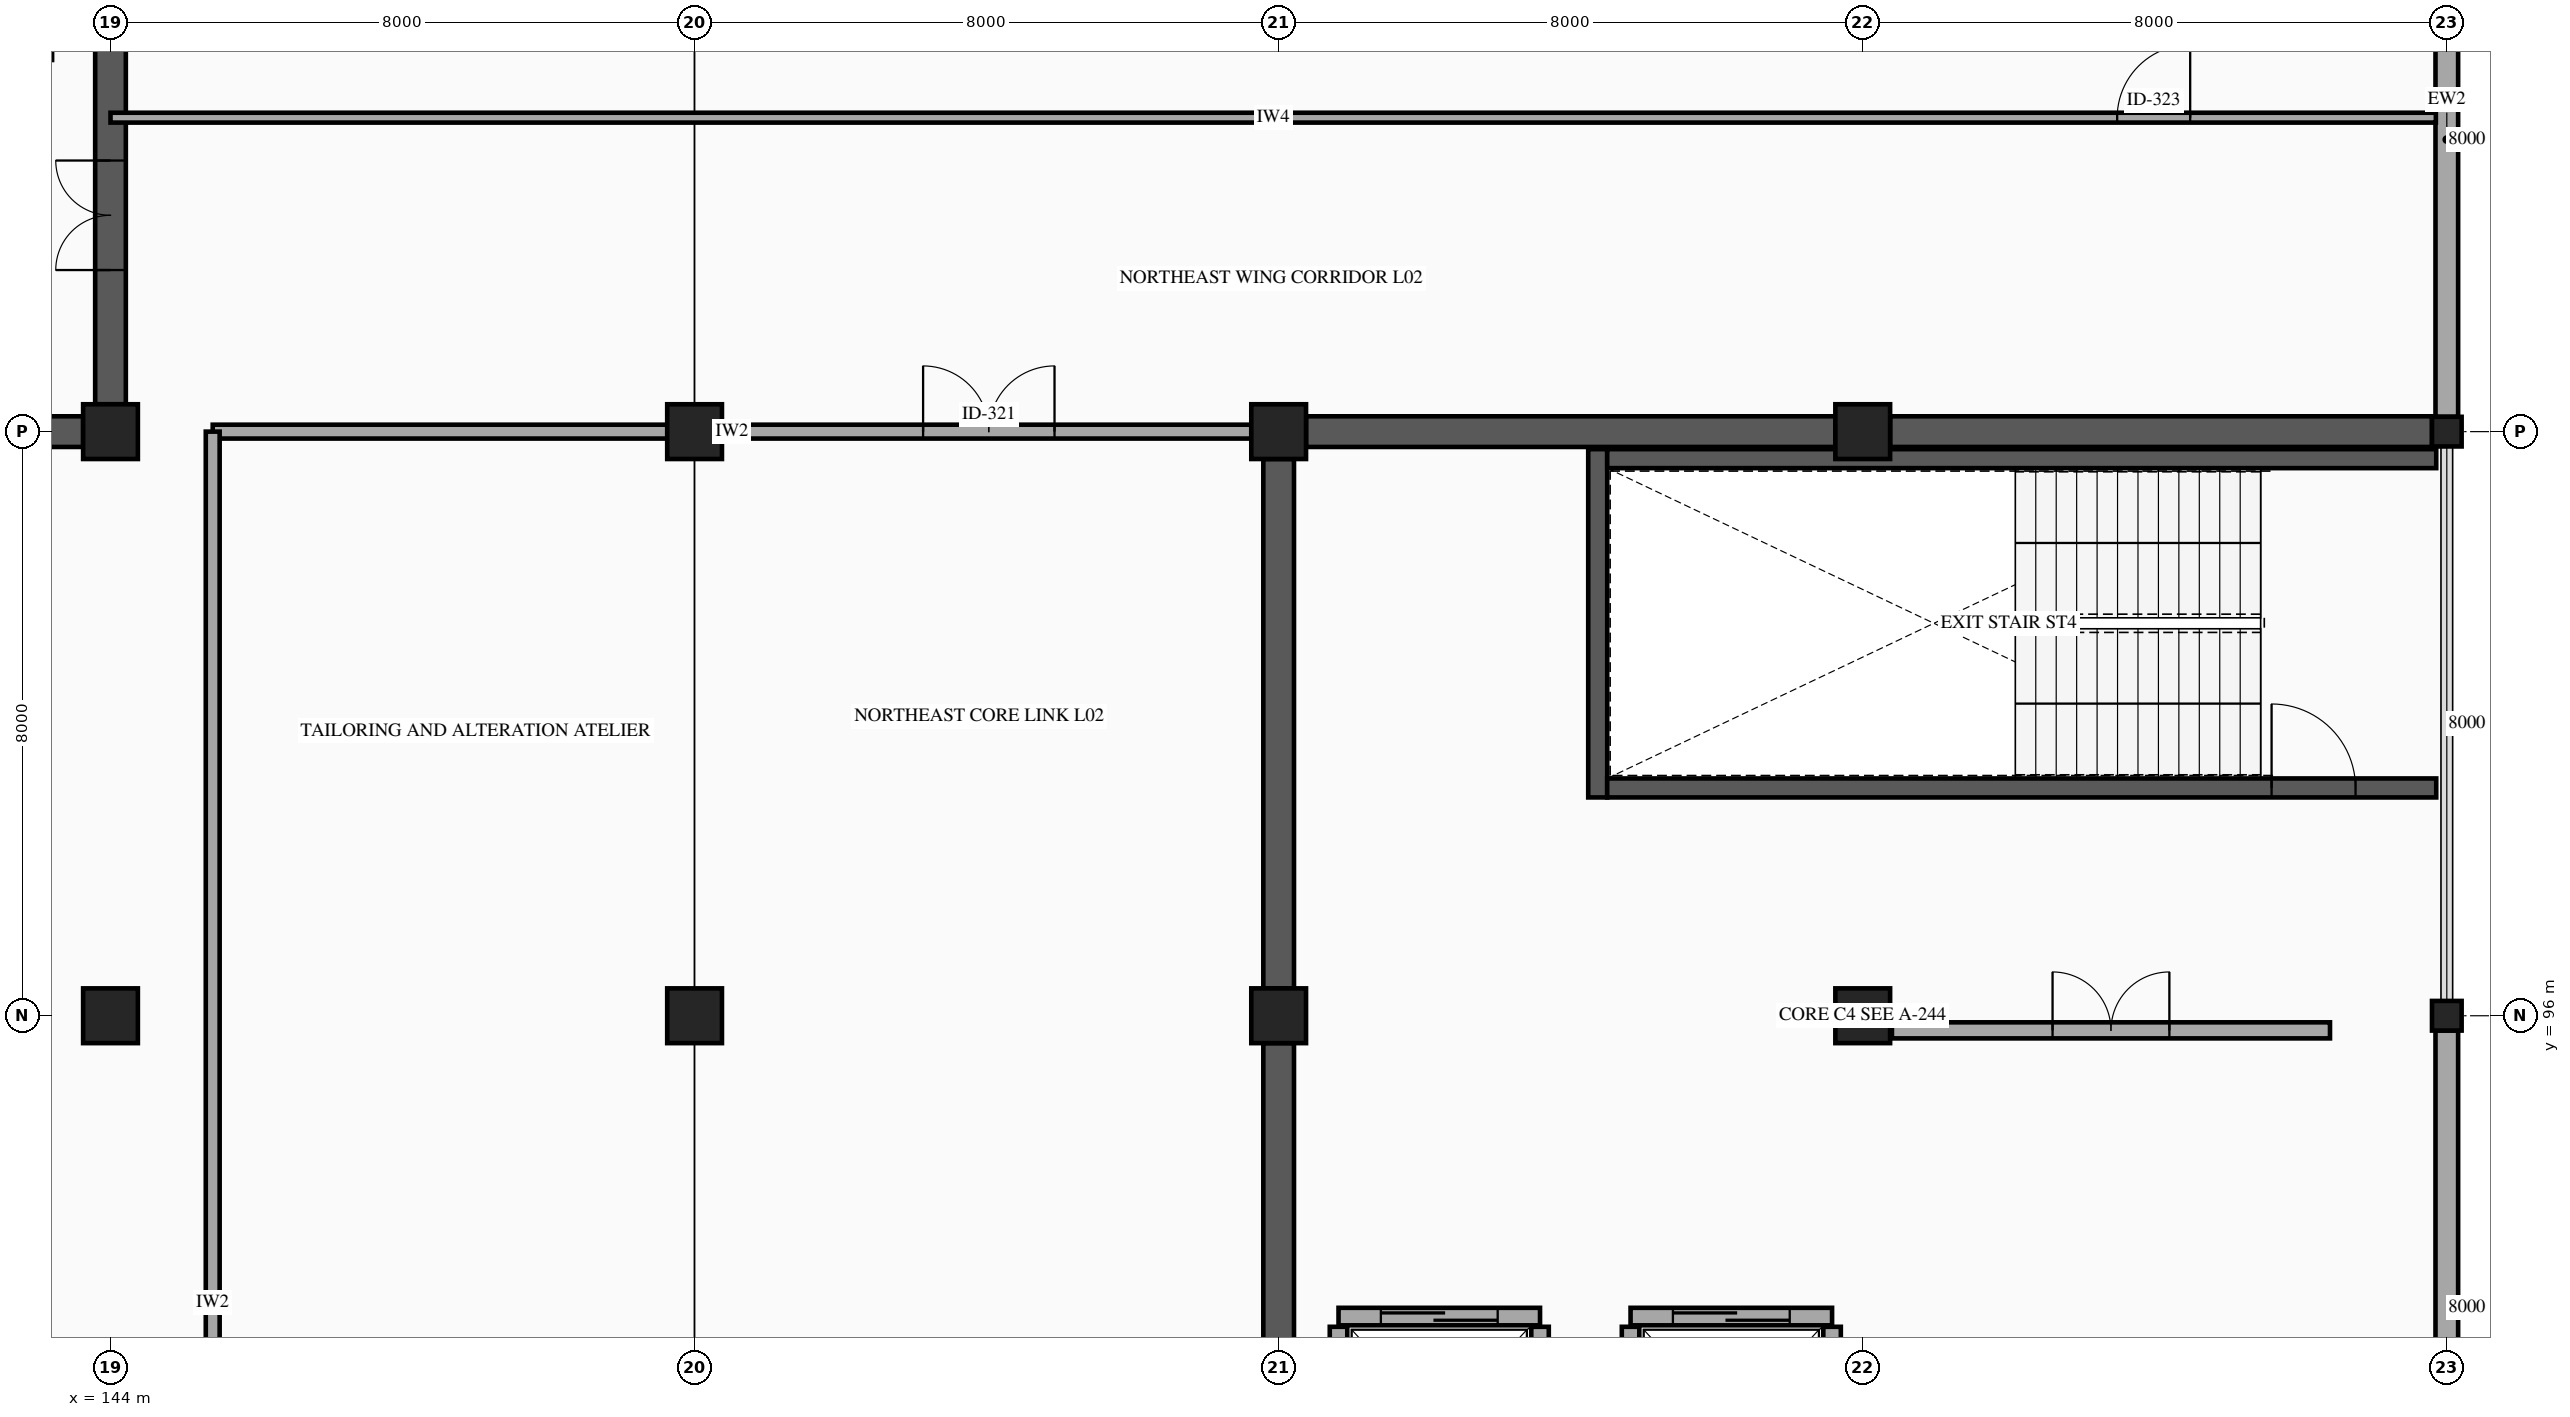
"""IFC4 building model, lengths in metres.
Left out: names, types, materials, properties, quantities, classifications, styles, units other than length and angle.
Written with IfcOpenShell. Run it as: python <this file> out.ifc"""

import sys

from ifc_helpers import new_model, si_unit, direction, frame, frame_2d, origin, origin_2d, place, context, subcontext, project, spatial, rectangle, hollow_rectangle, extrude, element, fill, save


model = new_model("IFC4")
c1 = context("Model", 3, precision=1e-05, world=origin(), true_north=direction((0.0, 1.0)))
c2 = subcontext(c1, "Body", "Model", "MODEL_VIEW")
j1 = project(units=[si_unit("LENGTHUNIT", "METRE"), si_unit("PLANEANGLEUNIT", "RADIAN")], contexts=[c1])
p1 = place(None, origin())
s1 = spatial("IfcSite", under=j1, at=p1, CompositionType="ELEMENT")
p2 = place(p1, origin())
s2 = spatial("IfcBuilding", under=s1, at=p2, CompositionType="ELEMENT")
p3 = place(p2, frame((0.0, 0.0, 10.4)))
s3 = spatial("IfcBuildingStorey", under=s2, at=p3, CompositionType="ELEMENT", Elevation=10.4)
for number, where, z_axis, x_axis in (
    (1, (144.0, 96.0, 0.0), (0.0, 0.0, 1.0), (1.0, 0.0, 0.0)),
    (2, (144.0, 104.0, 0.0), (0.0, 0.0, 1.0), (1.0, 0.0, 0.0)),
    (3, (152.0, 96.0, 0.0), (0.0, 0.0, 1.0), (1.0, 0.0, 0.0)),
    (4, (152.0, 104.0, 0.0), (0.0, 0.0, 1.0), (1.0, 0.0, 0.0)),
    (5, (160.0, 96.0, 0.0), (0.0, 0.0, 1.0), (1.0, 0.0, 0.0)),
    (6, (160.0, 104.0, 0.0), (0.0, 0.0, 1.0), (1.0, 0.0, 0.0)),
    (7, (168.0, 96.0, 0.0), (0.0, 0.0, 1.0), (1.0, 0.0, 0.0)),
    (8, (168.0, 104.0, 0.0), (0.0, 0.0, 1.0), (1.0, 0.0, 0.0)),
):
    element("IfcColumn", number, at=place(p3, frame(where, z_axis=z_axis, x_axis=x_axis)), inside=s3, PredefinedType="COLUMN", context=c2, shape_type="SweptSolid", body=[
        extrude(rectangle(XDim=0.75, YDim=0.75, at=origin_2d()), origin(), (0.0, 0.0, 1.0), 4.5),
    ])
for number, where, z_axis, x_axis in (
    (9, (176.0, 96.0, 0.0), (0.0, 0.0, 1.0), (1.0, 0.0, 0.0)),
    (10, (176.0, 104.0, 0.0), (0.0, 0.0, 1.0), (1.0, 0.0, 0.0)),
):
    element("IfcColumn", number, at=place(p3, frame(where, z_axis=z_axis, x_axis=x_axis)), inside=s3, PredefinedType="COLUMN", context=c2, shape_type="SweptSolid", body=[
        extrude(hollow_rectangle(XDim=0.406, YDim=0.406, WallThickness=0.015, InnerFilletRadius=0.015, OuterFilletRadius=0.029, at=origin_2d()), origin(), (0.0, 0.0, 1.0), 4.5),
    ])
for number, where, z_axis, x_axis in (
    (11, (176.0, 111.797, 0.0), (0.0, 0.0, 1.0), (0.0, -1.0, 0.0)),
    (12, (176.0, 95.797, 0.0), (0.0, 0.0, 1.0), (0.0, -1.0, 0.0)),
):
    element("IfcWall", number, at=place(p3, frame(where, z_axis=z_axis, x_axis=x_axis)), inside=s3, PredefinedType="STANDARD", context=c2, shape_type="SweptSolid", body=[
        extrude(rectangle(XDim=7.594, YDim=0.31, at=frame_2d((3.797, 0.0))), origin(), (0.0, 0.0, 1.0), 3.48),
    ])
p4 = place(p3, frame((136.375, 104.0, 0.0), z_axis=(0.0, 0.0, 1.0), x_axis=(1.0, 0.0, 0.0)))
e13 = element("IfcWall", 13, at=p4, inside=s3, PredefinedType="SHEAR", context=c2, shape_type="SweptSolid", body=[
    extrude(rectangle(XDim=7.25, YDim=0.42, at=frame_2d((3.625, 0.0))), origin(), (0.0, 0.0, 1.0), 4.28),
])
p5 = place(p4, frame((2.875, 0.0, 0.0)))
e14 = element("IfcOpeningElement", 14, at=p5, cuts=e13, PredefinedType="OPENING", context=c2, shape_type="SweptSolid", body=[
    extrude(rectangle(XDim=1.5, YDim=2.15, at=frame_2d((0.75, 1.075))), frame((0.0, 0.22, 0.0), z_axis=(0.0, -1.0, 0.0), x_axis=(1.0, 0.0, 0.0)), (0.0, 0.0, 1.0), 0.44),
])
p6 = place(p3, frame((144.0, 104.375, 0.0), z_axis=(0.0, 0.0, 1.0), x_axis=(0.0, 1.0, 0.0)))
e15 = element("IfcWall", 15, at=p6, inside=s3, PredefinedType="SHEAR", context=c2, shape_type="SweptSolid", body=[
    extrude(rectangle(XDim=7.25, YDim=0.42, at=frame_2d((3.625, 0.0))), origin(), (0.0, 0.0, 1.0), 4.28),
])
p7 = place(p6, frame((1.838, 0.0, 0.0)))
e16 = element("IfcOpeningElement", 16, at=p7, cuts=e15, PredefinedType="OPENING", context=c2, shape_type="SweptSolid", body=[
    extrude(rectangle(XDim=1.5, YDim=2.15, at=frame_2d((0.75, 1.075))), frame((0.0, 0.22, 0.0), z_axis=(0.0, -1.0, 0.0), x_axis=(1.0, 0.0, 0.0)), (0.0, 0.0, 1.0), 0.44),
])
p8 = place(p3, frame((164.37, 98.99, 0.0), z_axis=(0.0, 0.0, 1.0), x_axis=(0.0, 1.0, 0.0)))
e17 = element("IfcWall", 17, at=p8, inside=s3, PredefinedType="SHEAR", context=c2, shape_type="SweptSolid", body=[
    extrude(rectangle(XDim=4.77, YDim=0.26, at=frame_2d((2.385, 0.0))), origin(), (0.0, 0.0, 1.0), 4.28),
])
p9 = place(p3, frame((164.5, 99.12, 0.0), z_axis=(0.0, 0.0, 1.0), x_axis=(1.0, 0.0, 0.0)))
e18 = element("IfcWall", 18, at=p9, inside=s3, PredefinedType="SHEAR", context=c2, shape_type="SweptSolid", body=[
    extrude(rectangle(XDim=11.355, YDim=0.26, at=frame_2d((5.677, 0.0))), origin(), (0.0, 0.0, 1.0), 4.28),
])
p10 = place(p9, frame((9.1, 0.0, 0.0)))
e19 = element("IfcOpeningElement", 19, at=p10, cuts=e18, PredefinedType="OPENING", context=c2, shape_type="SweptSolid", body=[
    extrude(rectangle(XDim=1.15, YDim=2.15, at=frame_2d((0.575, 1.075))), frame((0.0, 0.14, 0.0), z_axis=(0.0, -1.0, 0.0), x_axis=(1.0, 0.0, 0.0)), (0.0, 0.0, 1.0), 0.28),
])
p11 = place(p3, frame((164.5, 103.63, 0.0), z_axis=(0.0, 0.0, 1.0), x_axis=(1.0, 0.0, 0.0)))
e20 = element("IfcWall", 20, at=p11, inside=s3, PredefinedType="SHEAR", context=c2, shape_type="SweptSolid", body=[
    extrude(rectangle(XDim=11.355, YDim=0.26, at=frame_2d((5.677, 0.0))), origin(), (0.0, 0.0, 1.0), 4.28),
])
p12 = place(p3, frame((160.375, 104.0, 0.0), z_axis=(0.0, 0.0, 1.0), x_axis=(1.0, 0.0, 0.0)))
e21 = element("IfcWall", 21, at=p12, inside=s3, PredefinedType="SHEAR", context=c2, shape_type="SweptSolid", body=[
    extrude(rectangle(XDim=7.25, YDim=0.42, at=frame_2d((3.625, 0.0))), origin(), (0.0, 0.0, 1.0), 4.28),
])
p13 = place(p3, frame((168.375, 104.0, 0.0), z_axis=(0.0, 0.0, 1.0), x_axis=(1.0, 0.0, 0.0)))
e22 = element("IfcWall", 22, at=p13, inside=s3, PredefinedType="SHEAR", context=c2, shape_type="SweptSolid", body=[
    extrude(rectangle(XDim=7.422, YDim=0.42, at=frame_2d((3.711, 0.0))), origin(), (0.0, 0.0, 1.0), 4.28),
])
for number, where, z_axis, x_axis in (
    (23, (160.0, 88.375, 0.0), (0.0, 0.0, 1.0), (0.0, 1.0, 0.0)),
    (24, (160.0, 96.375, 0.0), (0.0, 0.0, 1.0), (0.0, 1.0, 0.0)),
):
    element("IfcWall", number, at=place(p3, frame(where, z_axis=z_axis, x_axis=x_axis)), inside=s3, PredefinedType="SHEAR", context=c2, shape_type="SweptSolid", body=[
        extrude(rectangle(XDim=7.25, YDim=0.42, at=frame_2d((3.625, 0.0))), origin(), (0.0, 0.0, 1.0), 4.28),
    ])
p14 = place(p3, frame((164.82, 91.88, 0.0), z_axis=(0.0, 0.0, 1.0), x_axis=(1.0, 0.0, 0.0)))
e25 = element("IfcWall", 25, at=p14, inside=s3, PredefinedType="PARTITIONING", context=c2, shape_type="SweptSolid", body=[
    extrude(rectangle(XDim=2.76, YDim=0.24, at=frame_2d((1.38, 0.0))), origin(), (0.0, 0.0, 1.0), 4.28),
])
p15 = place(p14, frame((0.58, 0.0, 0.0)))
e26 = element("IfcOpeningElement", 26, at=p15, cuts=e25, PredefinedType="OPENING", context=c2, shape_type="SweptSolid", body=[
    extrude(rectangle(XDim=1.6, YDim=2.3, at=frame_2d((0.8, 1.15))), frame((0.0, 0.13, 0.0), z_axis=(0.0, -1.0, 0.0), x_axis=(1.0, 0.0, 0.0)), (0.0, 0.0, 1.0), 0.26),
])
for number, where, z_axis, x_axis in (
    (27, (164.82, 89.06, 0.0), (0.0, 0.0, 1.0), (0.0, 1.0, 0.0)),
    (28, (167.58, 89.06, 0.0), (0.0, 0.0, 1.0), (0.0, 1.0, 0.0)),
):
    element("IfcWall", number, at=place(p3, frame(where, z_axis=z_axis, x_axis=x_axis)), inside=s3, PredefinedType="PARTITIONING", context=c2, shape_type="SweptSolid", body=[
        extrude(rectangle(XDim=2.68, YDim=0.24, at=frame_2d((1.34, 0.0))), origin(), (0.0, 0.0, 1.0), 4.28),
    ])
p16 = place(p3, frame((160.82, 91.88, 0.0), z_axis=(0.0, 0.0, 1.0), x_axis=(1.0, 0.0, 0.0)))
e29 = element("IfcWall", 29, at=p16, inside=s3, PredefinedType="PARTITIONING", context=c2, shape_type="SweptSolid", body=[
    extrude(rectangle(XDim=2.76, YDim=0.24, at=frame_2d((1.38, 0.0))), origin(), (0.0, 0.0, 1.0), 4.28),
])
p17 = place(p16, frame((0.58, 0.0, 0.0)))
e30 = element("IfcOpeningElement", 30, at=p17, cuts=e29, PredefinedType="OPENING", context=c2, shape_type="SweptSolid", body=[
    extrude(rectangle(XDim=1.6, YDim=2.3, at=frame_2d((0.8, 1.15))), frame((0.0, 0.13, 0.0), z_axis=(0.0, -1.0, 0.0), x_axis=(1.0, 0.0, 0.0)), (0.0, 0.0, 1.0), 0.26),
])
for number, where, z_axis, x_axis in (
    (31, (160.82, 89.06, 0.0), (0.0, 0.0, 1.0), (0.0, 1.0, 0.0)),
    (32, (163.58, 89.06, 0.0), (0.0, 0.0, 1.0), (0.0, 1.0, 0.0)),
):
    element("IfcWall", number, at=place(p3, frame(where, z_axis=z_axis, x_axis=x_axis)), inside=s3, PredefinedType="PARTITIONING", context=c2, shape_type="SweptSolid", body=[
        extrude(rectangle(XDim=2.68, YDim=0.24, at=frame_2d((1.34, 0.0))), origin(), (0.0, 0.0, 1.0), 4.28),
    ])
p18 = place(p3, frame((168.4, 95.8, 0.0), z_axis=(0.0, 0.0, 1.0), x_axis=(1.0, 0.0, 0.0)))
e33 = element("IfcWall", 33, at=p18, inside=s3, PredefinedType="PARTITIONING", context=c2, shape_type="SweptSolid", body=[
    extrude(rectangle(XDim=6.0, YDim=0.22, at=frame_2d((3.0, 0.0))), origin(), (0.0, 0.0, 1.0), 3.48),
])
p19 = place(p18, frame((2.2, 0.0, 0.0)))
e34 = element("IfcOpeningElement", 34, at=p19, cuts=e33, PredefinedType="OPENING", context=c2, shape_type="SweptSolid", body=[
    extrude(rectangle(XDim=1.6, YDim=2.15, at=frame_2d((0.8, 1.075))), frame((0.0, 0.12, 0.0), z_axis=(0.0, -1.0, 0.0), x_axis=(1.0, 0.0, 0.0)), (0.0, 0.0, 1.0), 0.24),
])
p20 = place(p3, frame((145.4, 104.0, 0.0), z_axis=(0.0, 0.0, 1.0), x_axis=(1.0, 0.0, 0.0)))
e35 = element("IfcWall", 35, at=p20, inside=s3, PredefinedType="PARTITIONING", context=c2, shape_type="SweptSolid", body=[
    extrude(rectangle(XDim=14.225, YDim=0.19, at=frame_2d((7.113, 0.0))), origin(), (0.0, 0.0, 1.0), 3.48),
])
p21 = place(p20, frame((9.73, 0.0, 0.0)))
e36 = element("IfcOpeningElement", 36, at=p21, cuts=e35, PredefinedType="OPENING", context=c2, shape_type="SweptSolid", body=[
    extrude(rectangle(XDim=1.8, YDim=2.25, at=frame_2d((0.9, 1.125))), frame((0.0, 0.105, 0.0), z_axis=(0.0, -1.0, 0.0), x_axis=(1.0, 0.0, 0.0)), (0.0, 0.0, 1.0), 0.21),
])
p22 = place(p3, frame((145.4, 80.15, 0.0), z_axis=(0.0, 0.0, 1.0), x_axis=(0.0, 1.0, 0.0)))
e37 = element("IfcWall", 37, at=p22, inside=s3, PredefinedType="PARTITIONING", context=c2, shape_type="SweptSolid", body=[
    extrude(rectangle(XDim=23.85, YDim=0.19, at=frame_2d((11.925, 0.0))), origin(), (0.0, 0.0, 1.0), 3.48),
])
p23 = place(p22, frame((2.862, 0.0, 0.0)))
e38 = element("IfcOpeningElement", 38, at=p23, cuts=e37, PredefinedType="OPENING", context=c2, shape_type="SweptSolid", body=[
    extrude(rectangle(XDim=1.8, YDim=2.25, at=frame_2d((0.9, 1.125))), frame((0.0, 0.105, 0.0), z_axis=(0.0, -1.0, 0.0), x_axis=(1.0, 0.0, 0.0)), (0.0, 0.0, 1.0), 0.21),
])
p24 = place(p3, frame((144.0, 108.3, 0.0), z_axis=(0.0, 0.0, 1.0), x_axis=(1.0, 0.0, 0.0)))
e39 = element("IfcWall", 39, at=p24, inside=s3, PredefinedType="PARTITIONING", context=c2, shape_type="SweptSolid", body=[
    extrude(rectangle(XDim=31.85, YDim=0.135, at=frame_2d((15.925, 0.0))), origin(), (0.0, 0.0, 1.0), 3.48),
])
p25 = place(p24, frame((27.485, 0.0, 0.0)))
e40 = element("IfcOpeningElement", 40, at=p25, cuts=e39, PredefinedType="OPENING", context=c2, shape_type="SweptSolid", body=[
    extrude(rectangle(XDim=1.0, YDim=2.15, at=frame_2d((0.5, 1.075))), frame((0.0, 0.077, 0.0), z_axis=(0.0, -1.0, 0.0), x_axis=(1.0, 0.0, 0.0)), (0.0, 0.0, 1.0), 0.155),
])
p26 = place(p7, origin())
e41 = element("IfcDoor", 41, at=p26, inside=s3, OperationType="DOUBLE_DOOR_SINGLE_SWING", PredefinedType="DOOR", context=c2, shape_type="SweptSolid", body=[
    extrude(rectangle(XDim=1.5, YDim=2.15, at=frame_2d((0.75, 1.075))), frame((0.0, 0.025, 0.0), z_axis=(0.0, -1.0, 0.0), x_axis=(1.0, 0.0, 0.0)), (0.0, 0.0, 1.0), 0.05),
])
fill(e16, e41)
p27 = place(p10, origin())
e42 = element("IfcDoor", 42, at=p27, inside=s3, OperationType="SINGLE_SWING_LEFT", PredefinedType="DOOR", context=c2, shape_type="SweptSolid", body=[
    extrude(rectangle(XDim=1.15, YDim=2.15, at=frame_2d((0.575, 1.075))), frame((0.0, 0.025, 0.0), z_axis=(0.0, -1.0, 0.0), x_axis=(1.0, 0.0, 0.0)), (0.0, 0.0, 1.0), 0.05),
])
fill(e19, e42)
p28 = place(p15, origin())
e43 = element("IfcDoor", 43, at=p28, inside=s3, OperationType="SLIDING_TO_LEFT", PredefinedType="DOOR", context=c2, shape_type="SweptSolid", body=[
    extrude(rectangle(XDim=1.6, YDim=2.3, at=frame_2d((0.8, 1.15))), frame((0.0, 0.025, 0.0), z_axis=(0.0, -1.0, 0.0), x_axis=(1.0, 0.0, 0.0)), (0.0, 0.0, 1.0), 0.05),
])
fill(e26, e43)
p29 = place(p17, origin())
e44 = element("IfcDoor", 44, at=p29, inside=s3, OperationType="SLIDING_TO_LEFT", PredefinedType="DOOR", context=c2, shape_type="SweptSolid", body=[
    extrude(rectangle(XDim=1.6, YDim=2.3, at=frame_2d((0.8, 1.15))), frame((0.0, 0.025, 0.0), z_axis=(0.0, -1.0, 0.0), x_axis=(1.0, 0.0, 0.0)), (0.0, 0.0, 1.0), 0.05),
])
fill(e30, e44)
p30 = place(p19, origin())
e45 = element("IfcDoor", 45, at=p30, inside=s3, OperationType="DOUBLE_DOOR_SINGLE_SWING", PredefinedType="DOOR", context=c2, shape_type="SweptSolid", body=[
    extrude(rectangle(XDim=1.6, YDim=2.15, at=frame_2d((0.8, 1.075))), frame((0.0, 0.025, 0.0), z_axis=(0.0, -1.0, 0.0), x_axis=(1.0, 0.0, 0.0)), (0.0, 0.0, 1.0), 0.05),
])
fill(e34, e45)
p31 = place(p21, origin())
e46 = element("IfcDoor", 46, at=p31, inside=s3, OperationType="DOUBLE_DOOR_SINGLE_SWING", PredefinedType="DOOR", context=c2, shape_type="SweptSolid", body=[
    extrude(rectangle(XDim=1.8, YDim=2.25, at=frame_2d((0.9, 1.125))), frame((0.0, 0.025, 0.0), z_axis=(0.0, -1.0, 0.0), x_axis=(1.0, 0.0, 0.0)), (0.0, 0.0, 1.0), 0.05),
])
fill(e36, e46)
p32 = place(p25, origin())
e47 = element("IfcDoor", 47, at=p32, inside=s3, OperationType="SINGLE_SWING_RIGHT", PredefinedType="DOOR", context=c2, shape_type="SweptSolid", body=[
    extrude(rectangle(XDim=1.0, YDim=2.15, at=frame_2d((0.5, 1.075))), frame((0.0, 0.025, 0.0), z_axis=(0.0, -1.0, 0.0), x_axis=(1.0, 0.0, 0.0)), (0.0, 0.0, 1.0), 0.05),
])
fill(e40, e47)
save(model, sys.argv[1])
